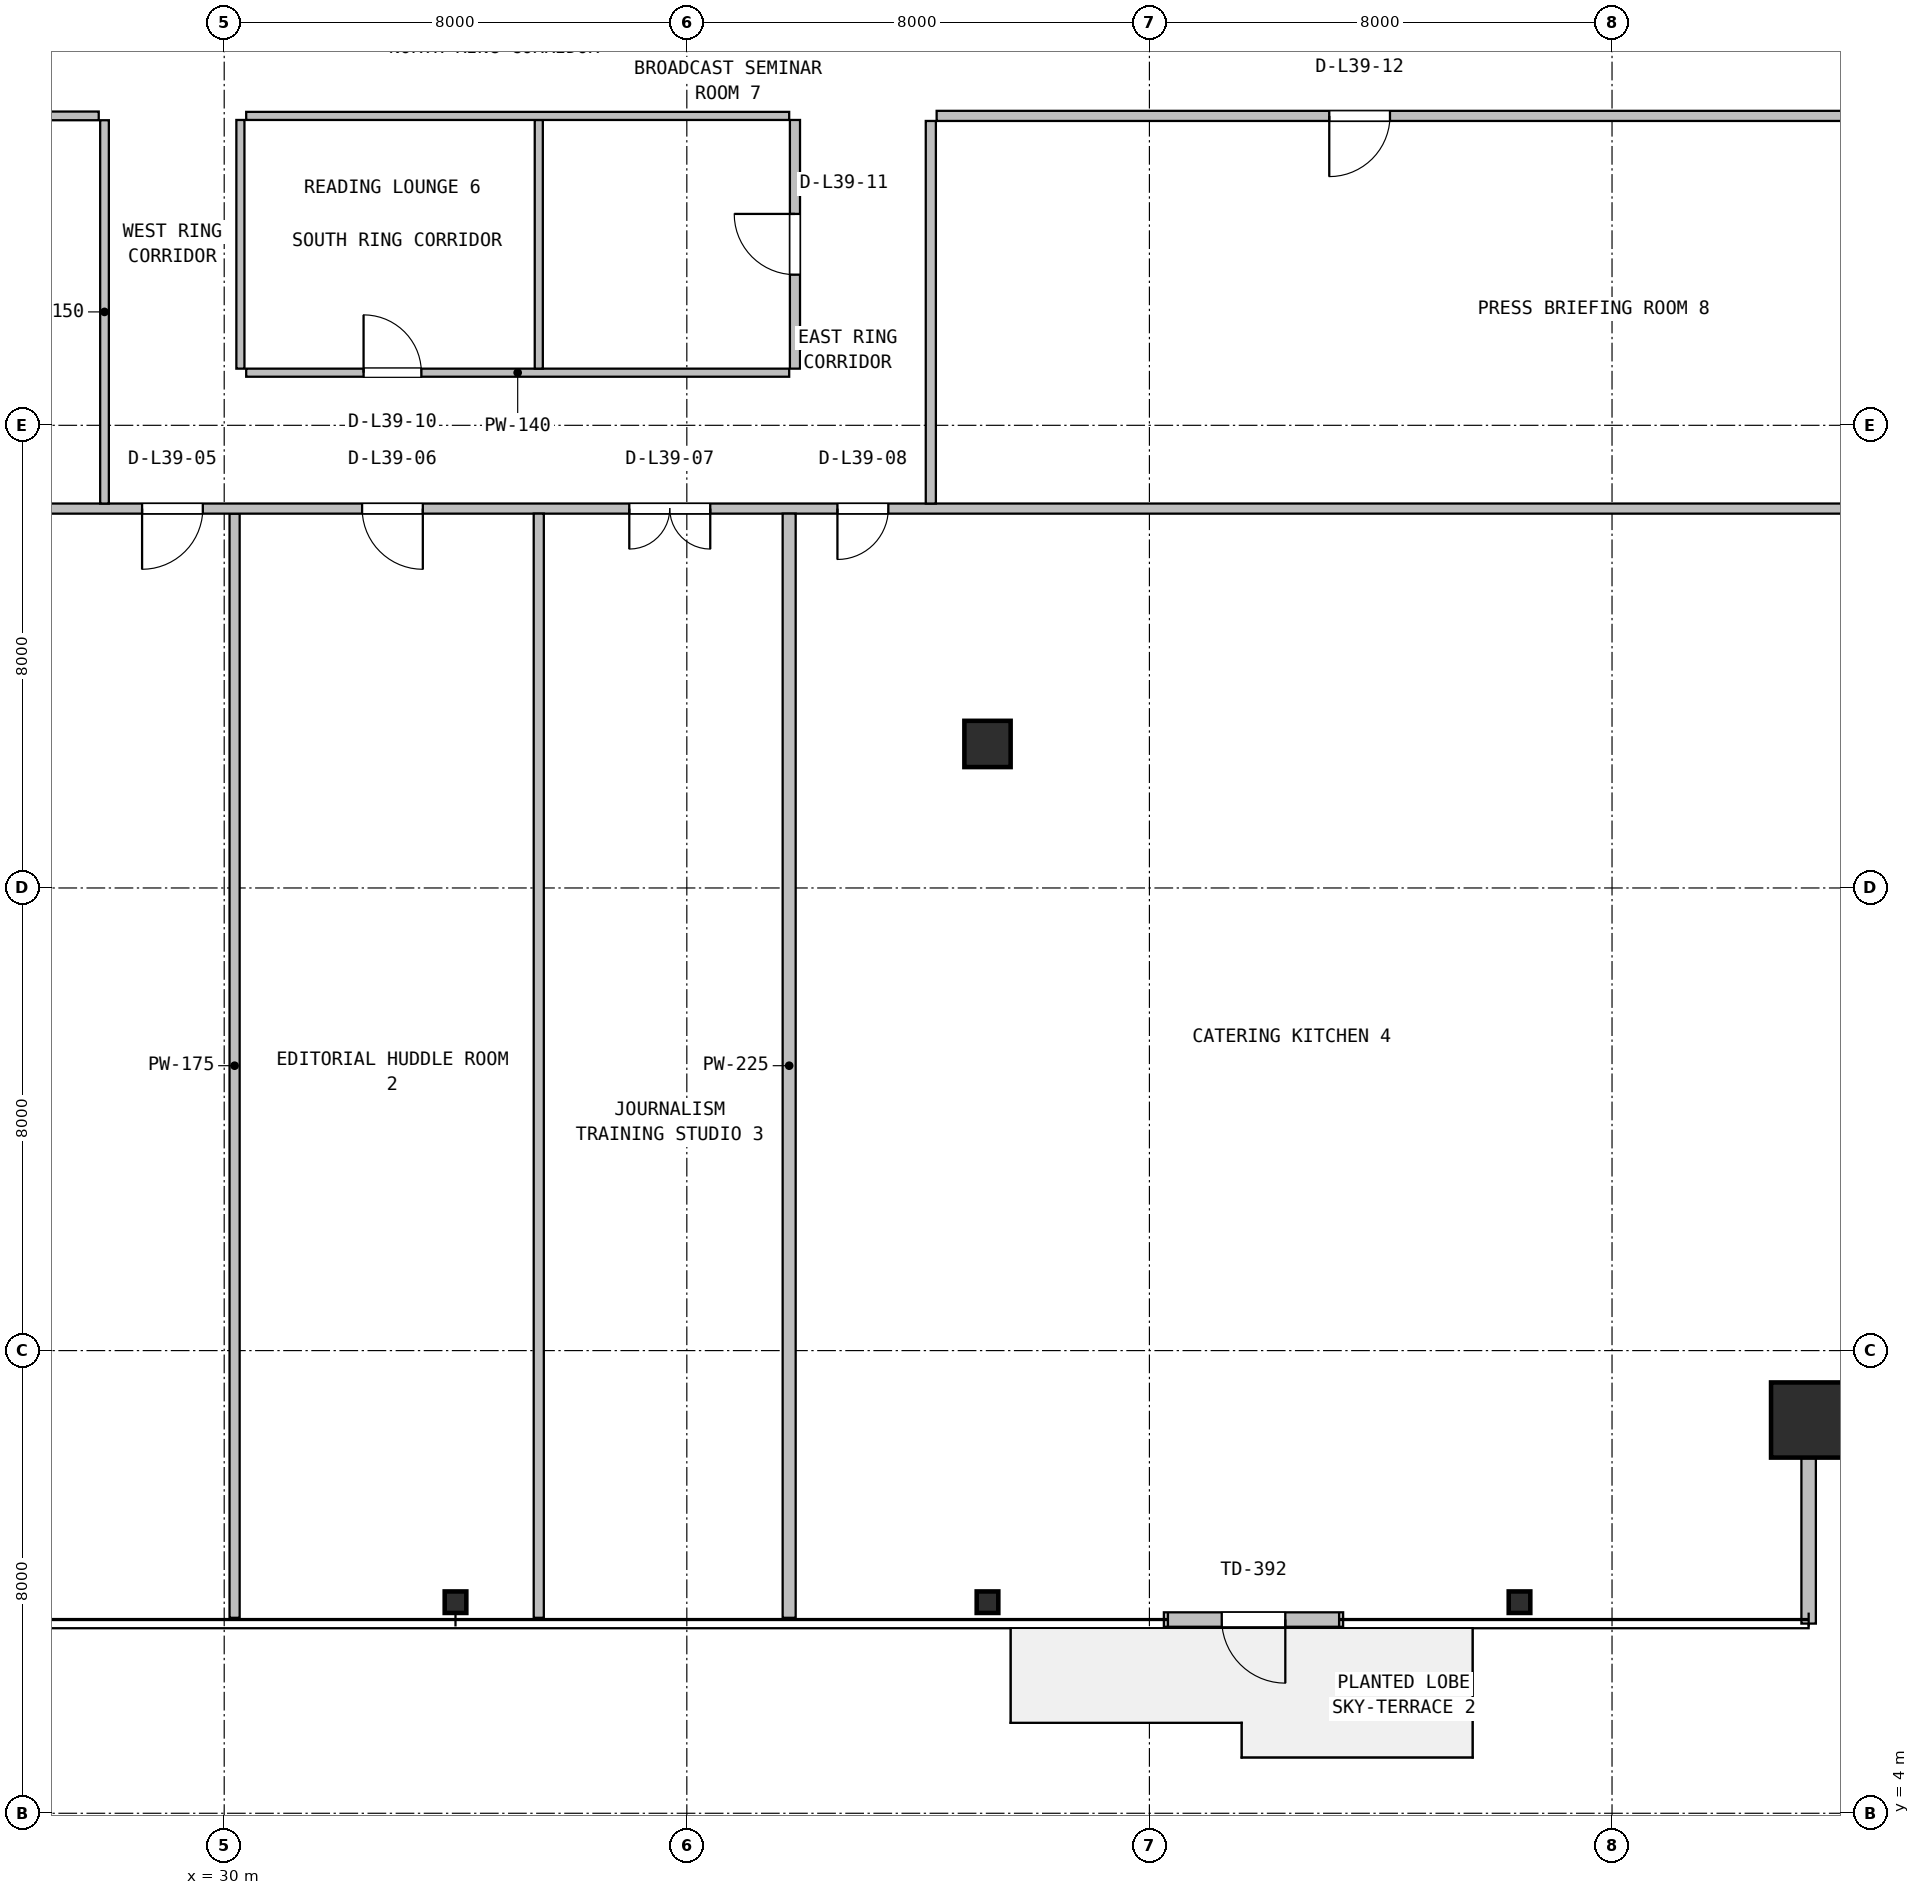
"""IFC4 building model, lengths in metres.
Left out: names, types, materials, properties, quantities, classifications, styles, units other than length and angle.
Written with IfcOpenShell. Run it as: python <this file> out.ifc"""

import sys

from ifc_helpers import new_model, si_unit, direction, frame, frame_2d, origin, origin_2d, place, context, subcontext, project, spatial, rectangle, hollow_rectangle, i_section, extrude, source, transform, mapped, element, fill, save


model = new_model("IFC4")
c1 = context("Model", 3, precision=1e-05, world=origin(), true_north=direction((0.0, 1.0)))
c2 = subcontext(c1, "Body", "Model", "MODEL_VIEW")
j1 = project(units=[si_unit("LENGTHUNIT", "METRE"), si_unit("PLANEANGLEUNIT", "RADIAN")], contexts=[c1])
p1 = place(None, origin())
s1 = spatial("IfcSite", under=j1, at=p1, CompositionType="ELEMENT")
p2 = place(p1, origin())
s2 = spatial("IfcBuilding", under=s1, at=p2, CompositionType="ELEMENT")
p3 = place(p2, frame((0.0, 0.0, 161.0)))
s3 = spatial("IfcBuildingStorey", under=s2, at=p3, CompositionType="ELEMENT", Elevation=161.0)
m1 = source(origin(), c2, "Body", "SweptSolid", [
    extrude(hollow_rectangle(XDim=1.3, YDim=1.3, WallThickness=0.05, at=origin_2d()), origin(), (0.0, 0.0, 1.0), 3.8),
])
p4 = place(p3, frame((57.4, 10.8, 0.0), z_axis=(0.0, 0.0, 1.0), x_axis=(1.0, 0.0, 0.0)))
e1 = element("IfcColumn", 1, at=p4, inside=s3, PredefinedType="COLUMN", context=c2, shape_type="MappedRepresentation", body=[
    mapped(m1, transform((0.0, 0.0, 0.0), x_axis=(1.0, 0.0, 0.0), y_axis=(0.0, 1.0, 0.0), z_axis=(0.0, 0.0, 1.0), scale=1.0)),
])
m2 = source(origin(), c2, "Body", "SweptSolid", [
    extrude(i_section(OverallWidth=0.374, OverallDepth=0.372, WebThickness=0.016, FlangeThickness=0.026, FilletRadius=0.016, at=origin_2d()), origin(), (0.0, 0.0, 1.0), 3.8),
])
for number, where, z_axis, x_axis in (
    (2, (34.0, 7.65, 0.0), (0.0, 0.0, 1.0), (1.0, 0.0, 0.0)),
    (3, (43.2, 7.65, 0.0), (0.0, 0.0, 1.0), (1.0, 0.0, 0.0)),
    (4, (52.4, 7.65, 0.0), (0.0, 0.0, 1.0), (1.0, 0.0, 0.0)),
):
    element("IfcColumn", number, at=place(p3, frame(where, z_axis=z_axis, x_axis=x_axis)), inside=s3, PredefinedType="COLUMN", context=c2, shape_type="MappedRepresentation", body=[
        mapped(m2, transform((0.0, 0.0, 0.0), x_axis=(1.0, 0.0, 0.0), y_axis=(0.0, 1.0, 0.0), z_axis=(0.0, 0.0, 1.0), scale=1.0)),
    ])
m3 = source(origin(), c2, "Body", "SweptSolid", [
    extrude(rectangle(XDim=0.8, YDim=0.8, at=origin_2d()), origin(), (0.0, 0.0, 1.0), 3.8),
])
p5 = place(p3, frame((43.2, 22.49, 0.0), z_axis=(0.0, 0.0, 1.0), x_axis=(1.0, 0.0, 0.0)))
e5 = element("IfcColumn", 5, at=p5, inside=s3, PredefinedType="COLUMN", context=c2, shape_type="MappedRepresentation", body=[
    mapped(m3, transform((0.0, 0.0, 0.0), x_axis=(1.0, 0.0, 0.0), y_axis=(0.0, 1.0, 0.0), z_axis=(0.0, 0.0, 1.0), scale=1.0)),
])
p6 = place(p3, frame((46.25, 7.35, 0.0), z_axis=(0.0, 0.0, 1.0), x_axis=(1.0, 0.0, 0.0)))
e6 = element("IfcWall", 6, at=p6, inside=s3, PredefinedType="SOLIDWALL", context=c2, shape_type="SweptSolid", body=[
    extrude(rectangle(XDim=3.1, YDim=0.25, at=frame_2d((1.55, 0.0))), origin(), (0.0, 0.0, 1.0), 3.53),
])
p7 = place(p6, frame((1.0, 0.0, 0.0)))
e7 = element("IfcOpeningElement", 7, at=p7, cuts=e6, PredefinedType="OPENING", context=c2, shape_type="SweptSolid", body=[
    extrude(rectangle(XDim=1.1, YDim=2.15, at=frame_2d((0.55, 1.075))), frame((0.0, 0.135, 0.0), z_axis=(0.0, -1.0, 0.0), x_axis=(1.0, 0.0, 0.0)), (0.0, 0.0, 1.0), 0.27),
])
p8 = place(p3, frame((57.4, 7.28, 0.0), z_axis=(0.0, 0.0, 1.0), x_axis=(0.0, 1.0, 0.0)))
e8 = element("IfcWall", 8, at=p8, inside=s3, PredefinedType="SOLIDWALL", context=c2, shape_type="SweptSolid", body=[
    extrude(rectangle(XDim=3.6, YDim=0.25, at=frame_2d((1.8, 0.0))), origin(), (0.0, 0.0, 1.0), 3.108),
])
p9 = place(p3, frame((30.18, 7.38, 0.0), z_axis=(0.0, 0.0, 1.0), x_axis=(0.0, 1.0, 0.0)))
e9 = element("IfcWall", 9, at=p9, inside=s3, PredefinedType="PARTITIONING", context=c2, shape_type="SweptSolid", body=[
    extrude(rectangle(XDim=19.093, YDim=0.175, at=frame_2d((9.546, 0.0))), origin(), (0.0, 0.0, 1.0), 2.909),
])
p10 = place(p3, frame((7.18, 26.56, 0.0), z_axis=(0.0, 0.0, 1.0), x_axis=(1.0, 0.0, 0.0)))
e10 = element("IfcWall", 10, at=p10, inside=s3, PredefinedType="PARTITIONING", context=c2, shape_type="SweptSolid", body=[
    extrude(rectangle(XDim=53.64, YDim=0.175, at=frame_2d((26.82, 0.0))), origin(), (0.0, 0.0, 1.0), 2.909),
])
p11 = place(p10, frame((21.4, 0.0, 0.0)))
e11 = element("IfcOpeningElement", 11, at=p11, cuts=e10, PredefinedType="OPENING", context=c2, shape_type="SweptSolid", body=[
    extrude(rectangle(XDim=1.05, YDim=2.1, at=frame_2d((0.525, 1.05))), frame((0.0, 0.098, 0.0), z_axis=(0.0, -1.0, 0.0), x_axis=(1.0, 0.0, 0.0)), (0.0, 0.0, 1.0), 0.195),
])
p12 = place(p10, frame((25.205, 0.0, 0.0)))
e12 = element("IfcOpeningElement", 12, at=p12, cuts=e10, PredefinedType="OPENING", context=c2, shape_type="SweptSolid", body=[
    extrude(rectangle(XDim=1.05, YDim=2.1, at=frame_2d((0.525, 1.05))), frame((0.0, 0.098, 0.0), z_axis=(0.0, -1.0, 0.0), x_axis=(1.0, 0.0, 0.0)), (0.0, 0.0, 1.0), 0.195),
])
p13 = place(p10, frame((29.825, 0.0, 0.0)))
e13 = element("IfcOpeningElement", 13, at=p13, cuts=e10, PredefinedType="OPENING", context=c2, shape_type="SweptSolid", body=[
    extrude(rectangle(XDim=1.4, YDim=2.12, at=frame_2d((0.7, 1.06))), frame((0.0, 0.098, 0.0), z_axis=(0.0, -1.0, 0.0), x_axis=(1.0, 0.0, 0.0)), (0.0, 0.0, 1.0), 0.195),
])
p14 = place(p10, frame((33.425, 0.0, 0.0)))
e14 = element("IfcOpeningElement", 14, at=p14, cuts=e10, PredefinedType="OPENING", context=c2, shape_type="SweptSolid", body=[
    extrude(rectangle(XDim=0.88, YDim=2.06, at=frame_2d((0.44, 1.03))), frame((0.0, 0.098, 0.0), z_axis=(0.0, -1.0, 0.0), x_axis=(1.0, 0.0, 0.0)), (0.0, 0.0, 1.0), 0.195),
])
p15 = place(p3, frame((35.44, 7.38, 0.0), z_axis=(0.0, 0.0, 1.0), x_axis=(0.0, 1.0, 0.0)))
e15 = element("IfcWall", 15, at=p15, inside=s3, PredefinedType="PARTITIONING", context=c2, shape_type="SweptSolid", body=[
    extrude(rectangle(XDim=19.093, YDim=0.175, at=frame_2d((9.546, 0.0))), origin(), (0.0, 0.0, 1.0), 2.909),
])
p16 = place(p3, frame((39.77, 7.38, 0.0), z_axis=(0.0, 0.0, 1.0), x_axis=(0.0, 1.0, 0.0)))
e16 = element("IfcWall", 16, at=p16, inside=s3, PredefinedType="PARTITIONING", context=c2, shape_type="SweptSolid", body=[
    extrude(rectangle(XDim=19.093, YDim=0.225, at=frame_2d((9.546, 0.0))), origin(), (0.0, 0.0, 1.0), 2.909),
])
p17 = place(p3, frame((27.93, 26.647, 0.0), z_axis=(0.0, 0.0, 1.0), x_axis=(0.0, 1.0, 0.0)))
e17 = element("IfcWall", 17, at=p17, inside=s3, PredefinedType="PARTITIONING", context=c2, shape_type="SweptSolid", body=[
    extrude(rectangle(XDim=6.628, YDim=0.15, at=frame_2d((3.314, 0.0))), origin(), (0.0, 0.0, 1.0), 3.222),
])
p18 = place(p3, frame((7.18, 33.35, 0.0), z_axis=(0.0, 0.0, 1.0), x_axis=(1.0, 0.0, 0.0)))
e18 = element("IfcWall", 18, at=p18, inside=s3, PredefinedType="PARTITIONING", context=c2, shape_type="SweptSolid", body=[
    extrude(rectangle(XDim=20.65, YDim=0.15, at=frame_2d((10.325, 0.0))), origin(), (0.0, 0.0, 1.0), 2.909),
])
p19 = place(p18, frame((11.8, 0.0, 0.0)))
e19 = element("IfcOpeningElement", 19, at=p19, cuts=e18, PredefinedType="OPENING", context=c2, shape_type="SweptSolid", body=[
    extrude(rectangle(XDim=0.92, YDim=2.08, at=frame_2d((0.46, 1.04))), frame((0.0, 0.085, 0.0), z_axis=(0.0, -1.0, 0.0), x_axis=(1.0, 0.0, 0.0)), (0.0, 0.0, 1.0), 0.17),
])
p20 = place(p3, frame((30.38, 28.91, 0.0), z_axis=(0.0, 0.0, 1.0), x_axis=(1.0, 0.0, 0.0)))
e20 = element("IfcWall", 20, at=p20, inside=s3, PredefinedType="PARTITIONING", context=c2, shape_type="SweptSolid", body=[
    extrude(rectangle(XDim=9.39, YDim=0.14, at=frame_2d((4.695, 0.0))), origin(), (0.0, 0.0, 1.0), 2.909),
])
p21 = place(p20, frame((2.03, 0.0, 0.0)))
e21 = element("IfcOpeningElement", 21, at=p21, cuts=e20, PredefinedType="OPENING", context=c2, shape_type="SweptSolid", body=[
    extrude(rectangle(XDim=1.0, YDim=2.1, at=frame_2d((0.5, 1.05))), frame((0.0, 0.08, 0.0), z_axis=(0.0, -1.0, 0.0), x_axis=(1.0, 0.0, 0.0)), (0.0, 0.0, 1.0), 0.16),
])
p22 = place(p3, frame((35.44, 28.98, 0.0), z_axis=(0.0, 0.0, 1.0), x_axis=(0.0, 1.0, 0.0)))
e22 = element("IfcWall", 22, at=p22, inside=s3, PredefinedType="PARTITIONING", context=c2, shape_type="SweptSolid", body=[
    extrude(rectangle(XDim=4.3, YDim=0.14, at=frame_2d((2.15, 0.0))), origin(), (0.0, 0.0, 1.0), 3.222),
])
p23 = place(p3, frame((30.38, 33.35, 0.0), z_axis=(0.0, 0.0, 1.0), x_axis=(1.0, 0.0, 0.0)))
e23 = element("IfcWall", 23, at=p23, inside=s3, PredefinedType="PARTITIONING", context=c2, shape_type="SweptSolid", body=[
    extrude(rectangle(XDim=9.39, YDim=0.14, at=frame_2d((4.695, 0.0))), origin(), (0.0, 0.0, 1.0), 2.909),
])
p24 = place(p3, frame((30.28, 28.98, 0.0), z_axis=(0.0, 0.0, 1.0), x_axis=(0.0, 1.0, 0.0)))
e24 = element("IfcWall", 24, at=p24, inside=s3, PredefinedType="PARTITIONING", context=c2, shape_type="SweptSolid", body=[
    extrude(rectangle(XDim=4.3, YDim=0.14, at=frame_2d((2.15, 0.0))), origin(), (0.0, 0.0, 1.0), 3.222),
])
p25 = place(p3, frame((39.87, 28.98, 0.0), z_axis=(0.0, 0.0, 1.0), x_axis=(0.0, 1.0, 0.0)))
e25 = element("IfcWall", 25, at=p25, inside=s3, PredefinedType="PARTITIONING", context=c2, shape_type="SweptSolid", body=[
    extrude(rectangle(XDim=4.3, YDim=0.175, at=frame_2d((2.15, 0.0))), origin(), (0.0, 0.0, 1.0), 3.222),
])
p26 = place(p25, frame((1.625, 0.0, 0.0)))
e26 = element("IfcOpeningElement", 26, at=p26, cuts=e25, PredefinedType="OPENING", context=c2, shape_type="SweptSolid", body=[
    extrude(rectangle(XDim=1.05, YDim=2.1, at=frame_2d((0.525, 1.05))), frame((0.0, 0.098, 0.0), z_axis=(0.0, -1.0, 0.0), x_axis=(1.0, 0.0, 0.0)), (0.0, 0.0, 1.0), 0.195),
])
p27 = place(p3, frame((42.32, 33.35, 0.0), z_axis=(0.0, 0.0, 1.0), x_axis=(1.0, 0.0, 0.0)))
e27 = element("IfcWall", 27, at=p27, inside=s3, PredefinedType="PARTITIONING", context=c2, shape_type="SweptSolid", body=[
    extrude(rectangle(XDim=18.5, YDim=0.175, at=frame_2d((9.25, 0.0))), origin(), (0.0, 0.0, 1.0), 2.909),
])
p28 = place(p27, frame((6.79, 0.0, 0.0)))
e28 = element("IfcOpeningElement", 28, at=p28, cuts=e27, PredefinedType="OPENING", context=c2, shape_type="SweptSolid", body=[
    extrude(rectangle(XDim=1.05, YDim=2.1, at=frame_2d((0.525, 1.05))), frame((0.0, 0.098, 0.0), z_axis=(0.0, -1.0, 0.0), x_axis=(1.0, 0.0, 0.0)), (0.0, 0.0, 1.0), 0.195),
])
p29 = place(p3, frame((42.22, 26.647, 0.0), z_axis=(0.0, 0.0, 1.0), x_axis=(0.0, 1.0, 0.0)))
e29 = element("IfcWall", 29, at=p29, inside=s3, PredefinedType="PARTITIONING", context=c2, shape_type="SweptSolid", body=[
    extrude(rectangle(XDim=6.616, YDim=0.175, at=frame_2d((3.308, 0.0))), origin(), (0.0, 0.0, 1.0), 3.222),
])
m4 = source(origin(), c2, "Body", "SweptSolid", [
    extrude(rectangle(XDim=1.1, YDim=2.15, at=frame_2d((0.55, 1.075))), frame((0.0, 0.025, 0.0), z_axis=(0.0, -1.0, 0.0), x_axis=(1.0, 0.0, 0.0)), (0.0, 0.0, 1.0), 0.05),
])
p30 = place(p7, frame((1.1, 0.0, 0.0), z_axis=(0.0, 0.0, 1.0), x_axis=(-1.0, 0.0, 0.0)))
e30 = element("IfcDoor", 30, at=p30, inside=s3, OperationType="SINGLE_SWING_RIGHT", PredefinedType="DOOR", context=c2, shape_type="MappedRepresentation", body=[
    mapped(m4, transform((0.0, 0.0, 0.0), x_axis=(1.0, 0.0, 0.0), y_axis=(0.0, 1.0, 0.0), z_axis=(0.0, 0.0, 1.0), scale=1.0)),
])
fill(e7, e30)
m5 = source(origin(), c2, "Body", "SweptSolid", [
    extrude(rectangle(XDim=1.05, YDim=2.1, at=frame_2d((0.525, 1.05))), frame((0.0, 0.025, 0.0), z_axis=(0.0, -1.0, 0.0), x_axis=(1.0, 0.0, 0.0)), (0.0, 0.0, 1.0), 0.05),
])
p31 = place(p11, frame((1.05, 0.0, 0.0), z_axis=(0.0, 0.0, 1.0), x_axis=(-1.0, 0.0, 0.0)))
e31 = element("IfcDoor", 31, at=p31, inside=s3, OperationType="SINGLE_SWING_LEFT", PredefinedType="DOOR", context=c2, shape_type="MappedRepresentation", body=[
    mapped(m5, transform((0.0, 0.0, 0.0), x_axis=(1.0, 0.0, 0.0), y_axis=(0.0, 1.0, 0.0), z_axis=(0.0, 0.0, 1.0), scale=1.0)),
])
fill(e11, e31)
p32 = place(p12, frame((1.05, 0.0, 0.0), z_axis=(0.0, 0.0, 1.0), x_axis=(-1.0, 0.0, 0.0)))
e32 = element("IfcDoor", 32, at=p32, inside=s3, OperationType="SINGLE_SWING_RIGHT", PredefinedType="DOOR", context=c2, shape_type="MappedRepresentation", body=[
    mapped(m5, transform((0.0, 0.0, 0.0), x_axis=(1.0, 0.0, 0.0), y_axis=(0.0, 1.0, 0.0), z_axis=(0.0, 0.0, 1.0), scale=1.0)),
])
fill(e12, e32)
m6 = source(origin(), c2, "Body", "SweptSolid", [
    extrude(rectangle(XDim=1.4, YDim=2.12, at=frame_2d((0.7, 1.06))), frame((0.0, 0.025, 0.0), z_axis=(0.0, -1.0, 0.0), x_axis=(1.0, 0.0, 0.0)), (0.0, 0.0, 1.0), 0.05),
])
p33 = place(p13, frame((1.4, 0.0, 0.0), z_axis=(0.0, 0.0, 1.0), x_axis=(-1.0, 0.0, 0.0)))
e33 = element("IfcDoor", 33, at=p33, inside=s3, OperationType="DOUBLE_DOOR_SINGLE_SWING", PredefinedType="DOOR", context=c2, shape_type="MappedRepresentation", body=[
    mapped(m6, transform((0.0, 0.0, 0.0), x_axis=(1.0, 0.0, 0.0), y_axis=(0.0, 1.0, 0.0), z_axis=(0.0, 0.0, 1.0), scale=1.0)),
])
fill(e13, e33)
m7 = source(origin(), c2, "Body", "SweptSolid", [
    extrude(rectangle(XDim=0.88, YDim=2.06, at=frame_2d((0.44, 1.03))), frame((0.0, 0.025, 0.0), z_axis=(0.0, -1.0, 0.0), x_axis=(1.0, 0.0, 0.0)), (0.0, 0.0, 1.0), 0.05),
])
p34 = place(p14, frame((0.88, 0.0, 0.0), z_axis=(0.0, 0.0, 1.0), x_axis=(-1.0, 0.0, 0.0)))
e34 = element("IfcDoor", 34, at=p34, inside=s3, OperationType="SINGLE_SWING_LEFT", PredefinedType="DOOR", context=c2, shape_type="MappedRepresentation", body=[
    mapped(m7, transform((0.0, 0.0, 0.0), x_axis=(1.0, 0.0, 0.0), y_axis=(0.0, 1.0, 0.0), z_axis=(0.0, 0.0, 1.0), scale=1.0)),
])
fill(e14, e34)
m8 = source(origin(), c2, "Body", "SweptSolid", [
    extrude(rectangle(XDim=1.0, YDim=2.1, at=frame_2d((0.5, 1.05))), frame((0.0, 0.025, 0.0), z_axis=(0.0, -1.0, 0.0), x_axis=(1.0, 0.0, 0.0)), (0.0, 0.0, 1.0), 0.05),
])
p35 = place(p21, origin())
e35 = element("IfcDoor", 35, at=p35, inside=s3, OperationType="SINGLE_SWING_LEFT", PredefinedType="DOOR", context=c2, shape_type="MappedRepresentation", body=[
    mapped(m8, transform((0.0, 0.0, 0.0), x_axis=(1.0, 0.0, 0.0), y_axis=(0.0, 1.0, 0.0), z_axis=(0.0, 0.0, 1.0), scale=1.0)),
])
fill(e21, e35)
p36 = place(p26, origin())
e36 = element("IfcDoor", 36, at=p36, inside=s3, OperationType="SINGLE_SWING_RIGHT", PredefinedType="DOOR", context=c2, shape_type="MappedRepresentation", body=[
    mapped(m5, transform((0.0, 0.0, 0.0), x_axis=(1.0, 0.0, 0.0), y_axis=(0.0, 1.0, 0.0), z_axis=(0.0, 0.0, 1.0), scale=1.0)),
])
fill(e26, e36)
p37 = place(p28, frame((1.05, 0.0, 0.0), z_axis=(0.0, 0.0, 1.0), x_axis=(-1.0, 0.0, 0.0)))
e37 = element("IfcDoor", 37, at=p37, inside=s3, OperationType="SINGLE_SWING_LEFT", PredefinedType="DOOR", context=c2, shape_type="MappedRepresentation", body=[
    mapped(m5, transform((0.0, 0.0, 0.0), x_axis=(1.0, 0.0, 0.0), y_axis=(0.0, 1.0, 0.0), z_axis=(0.0, 0.0, 1.0), scale=1.0)),
])
fill(e28, e37)
save(model, sys.argv[1])
